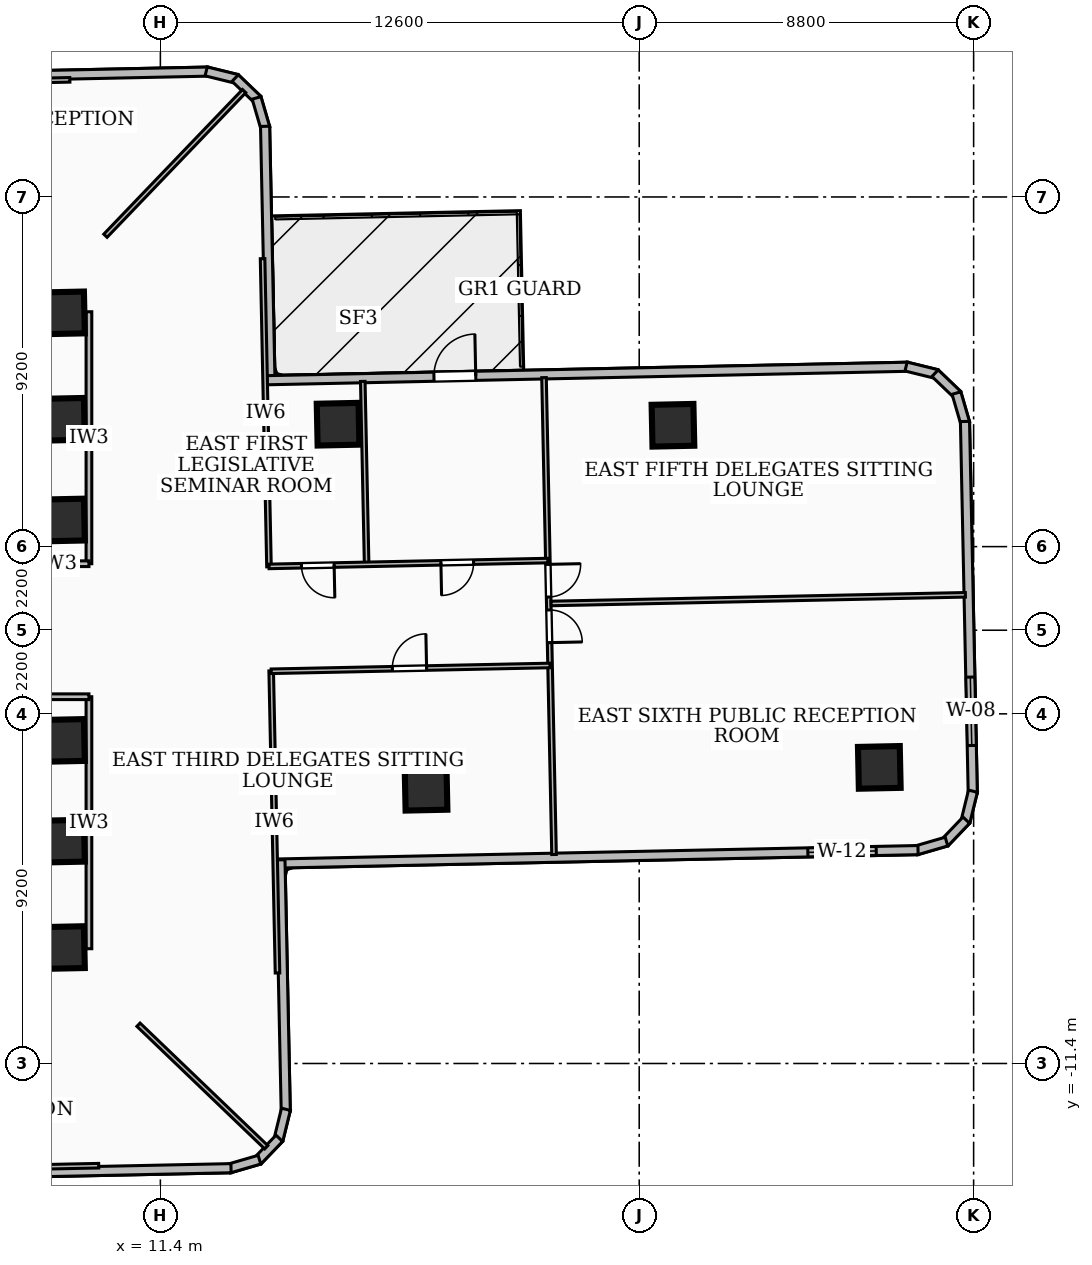
"""IFC4 building model, lengths in metres.
Left out: names, types, materials, properties, quantities, classifications, styles, units other than length and angle.
Written with IfcOpenShell. Run it as: python <this file> out.ifc"""

import sys

from ifc_helpers import new_model, si_unit, direction, frame, frame_2d, origin, origin_2d, place, context, subcontext, project, spatial, rectangle, extrude, element, fill, save


model = new_model("IFC4")
c1 = context("Model", 3, precision=1e-05, world=origin(), true_north=direction((0.0, 1.0)))
c2 = subcontext(c1, "Body", "Model", "MODEL_VIEW")
j1 = project(units=[si_unit("LENGTHUNIT", "METRE"), si_unit("PLANEANGLEUNIT", "RADIAN")], contexts=[c1])
p1 = place(None, origin())
s1 = spatial("IfcSite", under=j1, at=p1, CompositionType="ELEMENT")
p2 = place(p1, origin())
s2 = spatial("IfcBuilding", under=s1, at=p2, CompositionType="ELEMENT")
p3 = place(p2, frame((0.0, 0.0, 35.28)))
s3 = spatial("IfcBuildingStorey", under=s2, at=p3, CompositionType="ELEMENT", Elevation=35.28)
for number, where, z_axis, x_axis in (
    (1, (-8.78, 8.585, 0.0), (0.0, 0.0, 1.0), (1.0, 0.0, 0.0)),
    (2, (8.78, -8.585, 0.0), (0.0, 0.0, 1.0), (-1.0, 0.0, 0.0)),
):
    element("IfcWall", number, at=place(p3, frame(where, z_axis=z_axis, x_axis=x_axis)), inside=s3, PredefinedType="SHEAR", context=c2, shape_type="SweptSolid", body=[
        extrude(rectangle(XDim=17.56, YDim=0.55, at=frame_2d((8.78, 0.0))), origin(), (0.0, 0.0, 1.0), 3.34),
    ])
for number, where, z_axis, x_axis in (
    (3, (8.85, -5.55, 0.0), (0.0, 0.0, 1.0), (1.0, 0.021, 0.0)),
    (4, (8.85, -2.9, 0.0), (0.0, 0.0, 1.0), (1.0, 0.021, 0.0)),
    (5, (8.85, 2.9, 0.0), (0.0, 0.0, 1.0), (1.0, 0.021, 0.0)),
    (6, (8.85, 5.55, 0.0), (0.0, 0.0, 1.0), (1.0, 0.021, 0.0)),
    (7, (8.85, -8.35, 0.0), (0.0, 0.0, 1.0), (1.0, 0.021, 0.0)),
    (8, (8.85, 8.35, 0.0), (0.0, 0.0, 1.0), (1.0, 0.021, 0.0)),
    (9, (18.391, -4.184, 0.0), (0.0, 0.0, 1.0), (1.0, 0.021, 0.0)),
    (10, (16.076, 5.421, 0.0), (0.0, 0.0, 1.0), (1.0, 0.021, 0.0)),
    (11, (30.318, -3.609, 0.0), (0.0, 0.0, 1.0), (1.0, 0.021, 0.0)),
    (12, (24.888, 5.393, 0.0), (0.0, 0.0, 1.0), (1.0, 0.021, 0.0)),
):
    element("IfcColumn", number, at=place(p3, frame(where, z_axis=z_axis, x_axis=x_axis)), inside=s3, PredefinedType="COLUMN", context=c2, shape_type="SweptSolid", body=[
        extrude(rectangle(XDim=1.1, YDim=1.1, at=origin_2d()), origin(), (0.0, 0.0, 1.0), 3.6),
    ])
p4 = place(p3, frame((6.041, 14.559, 0.0), z_axis=(0.0, 0.0, 1.0), x_axis=(0.999776327957, 0.021149327571, 0.0)))
e13 = element("IfcWall", 13, at=p4, inside=s3, PredefinedType="SOLIDWALL", context=c2, shape_type="SweptSolid", body=[
    extrude(rectangle(XDim=6.615, YDim=0.24, at=frame_2d((3.307, 0.0))), origin(), (0.0, 0.0, 1.0), 2.421),
])
p5 = place(p3, frame((12.605, 14.704, 0.0), z_axis=(0.0, 0.0, 1.0), x_axis=(0.971120878097, -0.238588013371, 0.0)))
e14 = element("IfcWall", 14, at=p5, inside=s3, PredefinedType="SOLIDWALL", context=c2, shape_type="SweptSolid", body=[
    extrude(rectangle(XDim=0.83, YDim=0.24, at=frame_2d((0.415, 0.0))), origin(), (0.0, 0.0, 1.0), 3.34),
])
p6 = place(p3, frame((13.369, 14.529, 0.0), z_axis=(0.0, 0.0, 1.0), x_axis=(0.721807017337, -0.692094379202, 0.0)))
e15 = element("IfcWall", 15, at=p6, inside=s3, PredefinedType="SOLIDWALL", context=c2, shape_type="SweptSolid", body=[
    extrude(rectangle(XDim=0.813, YDim=0.24, at=frame_2d((0.407, 0.0))), origin(), (0.0, 0.0, 1.0), 3.34),
])
p7 = place(p3, frame((13.931, 14.007, 0.0), z_axis=(0.0, 0.0, 1.0), x_axis=(0.279649933772, -0.960102033401, 0.0)))
e16 = element("IfcWall", 16, at=p7, inside=s3, PredefinedType="SOLIDWALL", context=c2, shape_type="SweptSolid", body=[
    extrude(rectangle(XDim=0.83, YDim=0.24, at=frame_2d((0.415, 0.0))), origin(), (0.0, 0.0, 1.0), 3.34),
])
p8 = place(p3, frame((14.155, 13.259, 0.0), z_axis=(0.0, 0.0, 1.0), x_axis=(0.021111649844, -0.999777124284, 0.0)))
e17 = element("IfcWall", 17, at=p8, inside=s3, PredefinedType="SOLIDWALL", context=c2, shape_type="SweptSolid", body=[
    extrude(rectangle(XDim=6.777, YDim=0.24, at=frame_2d((3.388, 0.0))), origin(), (0.0, 0.0, 1.0), 2.644),
])
p9 = place(p3, frame((14.2, 6.578, 0.0), z_axis=(0.0, 0.0, 1.0), x_axis=(0.999778412505, 0.021050555542, 0.0)))
e18 = element("IfcWall", 18, at=p9, inside=s3, PredefinedType="SOLIDWALL", context=c2, shape_type="SweptSolid", body=[
    extrude(rectangle(XDim=16.875, YDim=0.24, at=frame_2d((8.438, 0.0))), origin(), (0.0, 0.0, 1.0), 2.644),
])
p10 = place(p9, frame((4.4, 0.0, 0.0)))
e19 = element("IfcOpeningElement", 19, at=p10, cuts=e18, PredefinedType="OPENING", context=c2, shape_type="SweptSolid", body=[
    extrude(rectangle(XDim=1.1, YDim=2.1, at=frame_2d((0.55, 1.05))), frame((0.0, 0.13, 0.0), z_axis=(0.0, -1.0, 0.0), x_axis=(1.0, 0.0, 0.0)), (0.0, 0.0, 1.0), 0.26),
])
p11 = place(p3, frame((31.022, 6.938, 0.0), z_axis=(0.0, 0.0, 1.0), x_axis=(0.971120878097, -0.238588013371, 0.0)))
e20 = element("IfcWall", 20, at=p11, inside=s3, PredefinedType="SOLIDWALL", context=c2, shape_type="SweptSolid", body=[
    extrude(rectangle(XDim=0.83, YDim=0.24, at=frame_2d((0.415, 0.0))), origin(), (0.0, 0.0, 1.0), 3.34),
])
p12 = place(p3, frame((31.786, 6.763, 0.0), z_axis=(0.0, 0.0, 1.0), x_axis=(0.721807017337, -0.692094379202, 0.0)))
e21 = element("IfcWall", 21, at=p12, inside=s3, PredefinedType="SOLIDWALL", context=c2, shape_type="SweptSolid", body=[
    extrude(rectangle(XDim=0.813, YDim=0.24, at=frame_2d((0.407, 0.0))), origin(), (0.0, 0.0, 1.0), 3.34),
])
p13 = place(p3, frame((32.348, 6.241, 0.0), z_axis=(0.0, 0.0, 1.0), x_axis=(0.2797289077, -0.960079027058, 0.0)))
e22 = element("IfcWall", 22, at=p13, inside=s3, PredefinedType="SOLIDWALL", context=c2, shape_type="SweptSolid", body=[
    extrude(rectangle(XDim=0.83, YDim=0.24, at=frame_2d((0.415, 0.0))), origin(), (0.0, 0.0, 1.0), 3.34),
])
p14 = place(p3, frame((32.572, 5.493, 0.0), z_axis=(0.0, 0.0, 1.0), x_axis=(0.020971264701, -0.999780078846, 0.0)))
e23 = element("IfcWall", 23, at=p14, inside=s3, PredefinedType="SOLIDWALL", context=c2, shape_type="SweptSolid", body=[
    extrude(rectangle(XDim=9.779, YDim=0.24, at=frame_2d((4.89, 0.0))), origin(), (0.0, 0.0, 1.0), 3.34),
])
p15 = place(p14, frame((6.728, 0.0, 0.85)))
e24 = element("IfcOpeningElement", 24, at=p15, cuts=e23, PredefinedType="OPENING", context=c2, shape_type="SweptSolid", body=[
    extrude(rectangle(XDim=1.8, YDim=1.8, at=frame_2d((0.9, 0.9))), frame((0.0, 0.13, 0.0), z_axis=(0.0, -1.0, 0.0), x_axis=(1.0, 0.0, 0.0)), (0.0, 0.0, 1.0), 0.26),
])
p16 = place(p3, frame((32.782, -4.235, 0.0), z_axis=(0.0, 0.0, 1.0), x_axis=(-0.238860968489, -0.971053776952, 0.0)))
e25 = element("IfcWall", 25, at=p16, inside=s3, PredefinedType="SOLIDWALL", context=c2, shape_type="SweptSolid", body=[
    extrude(rectangle(XDim=0.829, YDim=0.24, at=frame_2d((0.415, 0.0))), origin(), (0.0, 0.0, 1.0), 3.34),
])
p17 = place(p3, frame((32.607, -4.998, 0.0), z_axis=(0.0, 0.0, 1.0), x_axis=(-0.691018151037, -0.722837405602, 0.0)))
e26 = element("IfcWall", 26, at=p17, inside=s3, PredefinedType="SOLIDWALL", context=c2, shape_type="SweptSolid", body=[
    extrude(rectangle(XDim=0.813, YDim=0.24, at=frame_2d((0.407, 0.0))), origin(), (0.0, 0.0, 1.0), 3.34),
])
p18 = place(p3, frame((32.086, -5.561, 0.0), z_axis=(0.0, 0.0, 1.0), x_axis=(-0.960249728562, -0.279142362954, 0.0)))
e27 = element("IfcWall", 27, at=p18, inside=s3, PredefinedType="SOLIDWALL", context=c2, shape_type="SweptSolid", body=[
    extrude(rectangle(XDim=0.831, YDim=0.24, at=frame_2d((0.416, 0.0))), origin(), (0.0, 0.0, 1.0), 3.34),
])
p19 = place(p3, frame((31.337, -5.785, 0.0), z_axis=(0.0, 0.0, 1.0), x_axis=(-0.999779951425, -0.020977338469, 0.0)))
e28 = element("IfcWall", 28, at=p19, inside=s3, PredefinedType="SOLIDWALL", context=c2, shape_type="SweptSolid", body=[
    extrude(rectangle(XDim=16.875, YDim=0.24, at=frame_2d((8.438, 0.0))), origin(), (0.0, 0.0, 1.0), 3.34),
])
p20 = place(p19, frame((1.1, 0.0, 0.85)))
e29 = element("IfcOpeningElement", 29, at=p20, cuts=e28, PredefinedType="OPENING", context=c2, shape_type="SweptSolid", body=[
    extrude(rectangle(XDim=1.8, YDim=1.6, at=frame_2d((0.9, 0.8))), frame((0.0, 0.13, 0.0), z_axis=(0.0, -1.0, 0.0), x_axis=(1.0, 0.0, 0.0)), (0.0, 0.0, 1.0), 0.26),
])
p21 = place(p3, frame((14.559, -6.041, 0.0), z_axis=(0.0, 0.0, 1.0), x_axis=(0.021149327571, -0.999776327957, 0.0)))
e30 = element("IfcWall", 30, at=p21, inside=s3, PredefinedType="SOLIDWALL", context=c2, shape_type="SweptSolid", body=[
    extrude(rectangle(XDim=6.615, YDim=0.24, at=frame_2d((3.307, 0.0))), origin(), (0.0, 0.0, 1.0), 3.34),
])
p22 = place(p3, frame((14.704, -12.605, 0.0), z_axis=(0.0, 0.0, 1.0), x_axis=(-0.238588013371, -0.971120878097, 0.0)))
e31 = element("IfcWall", 31, at=p22, inside=s3, PredefinedType="SOLIDWALL", context=c2, shape_type="SweptSolid", body=[
    extrude(rectangle(XDim=0.83, YDim=0.24, at=frame_2d((0.415, 0.0))), origin(), (0.0, 0.0, 1.0), 3.34),
])
p23 = place(p3, frame((14.529, -13.369, 0.0), z_axis=(0.0, 0.0, 1.0), x_axis=(-0.692094379202, -0.721807017337, 0.0)))
e32 = element("IfcWall", 32, at=p23, inside=s3, PredefinedType="SOLIDWALL", context=c2, shape_type="SweptSolid", body=[
    extrude(rectangle(XDim=0.813, YDim=0.24, at=frame_2d((0.407, 0.0))), origin(), (0.0, 0.0, 1.0), 3.34),
])
p24 = place(p3, frame((14.007, -13.931, 0.0), z_axis=(0.0, 0.0, 1.0), x_axis=(-0.960102033401, -0.279649933772, 0.0)))
e33 = element("IfcWall", 33, at=p24, inside=s3, PredefinedType="SOLIDWALL", context=c2, shape_type="SweptSolid", body=[
    extrude(rectangle(XDim=0.83, YDim=0.24, at=frame_2d((0.415, 0.0))), origin(), (0.0, 0.0, 1.0), 3.34),
])
p25 = place(p3, frame((13.259, -14.155, 0.0), z_axis=(0.0, 0.0, 1.0), x_axis=(-0.999777124284, -0.021111649844, 0.0)))
e34 = element("IfcWall", 34, at=p25, inside=s3, PredefinedType="SOLIDWALL", context=c2, shape_type="SweptSolid", body=[
    extrude(rectangle(XDim=6.777, YDim=0.24, at=frame_2d((3.388, 0.0))), origin(), (0.0, 0.0, 1.0), 3.34),
])
p26 = place(p3, frame((9.52, 1.75, 0.0), z_axis=(0.0, 0.0, 1.0), x_axis=(0.0, 1.0, 0.0)))
e35 = element("IfcWall", 35, at=p26, inside=s3, PredefinedType="PARTITIONING", context=c2, shape_type="SweptSolid", body=[
    extrude(rectangle(XDim=6.63, YDim=0.15, at=frame_2d((3.315, 0.0))), origin(), (0.0, 0.0, 1.0), 2.421),
])
p27 = place(p3, frame((7.85, 1.75, 0.0), z_axis=(0.0, 0.0, 1.0), x_axis=(1.0, 0.0, 0.0)))
e36 = element("IfcWall", 36, at=p27, inside=s3, PredefinedType="PARTITIONING", context=c2, shape_type="SweptSolid", body=[
    extrude(rectangle(XDim=1.67, YDim=0.15, at=frame_2d((0.835, 0.0))), origin(), (0.0, 0.0, 1.0), 2.405),
])
p28 = place(p3, frame((9.52, -8.38, 0.0), z_axis=(0.0, 0.0, 1.0), x_axis=(0.0, 1.0, 0.0)))
e37 = element("IfcWall", 37, at=p28, inside=s3, PredefinedType="PARTITIONING", context=c2, shape_type="SweptSolid", body=[
    extrude(rectangle(XDim=6.63, YDim=0.15, at=frame_2d((3.315, 0.0))), origin(), (0.0, 0.0, 1.0), 2.421),
])
p29 = place(p3, frame((7.85, -1.75, 0.0), z_axis=(0.0, 0.0, 1.0), x_axis=(1.0, 0.0, 0.0)))
e38 = element("IfcWall", 38, at=p29, inside=s3, PredefinedType="PARTITIONING", context=c2, shape_type="SweptSolid", body=[
    extrude(rectangle(XDim=1.67, YDim=0.15, at=frame_2d((0.835, 0.0))), origin(), (0.0, 0.0, 1.0), 2.405),
])
p30 = place(p3, frame((9.954, 10.38, 0.0), z_axis=(0.0, 0.0, 1.0), x_axis=(0.692136602063, 0.721766530178, 0.0)))
e39 = element("IfcWall", 39, at=p30, inside=s3, PredefinedType="PARTITIONING", context=c2, shape_type="SweptSolid", body=[
    extrude(rectangle(XDim=5.273, YDim=0.12, at=frame_2d((2.637, 0.0))), origin(), (0.0, 0.0, 1.0), 2.644),
])
p31 = place(p3, frame((10.824, -10.38, 0.0), z_axis=(0.0, 0.0, 1.0), x_axis=(0.721757981693, -0.692145516392, 0.0)))
e40 = element("IfcWall", 40, at=p31, inside=s3, PredefinedType="PARTITIONING", context=c2, shape_type="SweptSolid", body=[
    extrude(rectangle(XDim=4.658, YDim=0.12, at=frame_2d((2.329, 0.0))), origin(), (0.0, 0.0, 1.0), 3.34),
])
p32 = place(p3, frame((14.258, 1.669, 0.0), z_axis=(0.0, 0.0, 1.0), x_axis=(-0.020831948152, 0.999782991422, 0.0)))
e41 = element("IfcWall", 41, at=p32, inside=s3, PredefinedType="PARTITIONING", context=c2, shape_type="SweptSolid", body=[
    extrude(rectangle(XDim=8.11, YDim=0.12, at=frame_2d((4.055, 0.0))), origin(), (0.0, 0.0, 1.0), 2.421),
])
p33 = place(p3, frame((14.482, -9.018, 0.0), z_axis=(0.0, 0.0, 1.0), x_axis=(-0.020883173321, 0.999781922757, 0.0)))
e42 = element("IfcWall", 42, at=p33, inside=s3, PredefinedType="PARTITIONING", context=c2, shape_type="SweptSolid", body=[
    extrude(rectangle(XDim=7.95, YDim=0.12, at=frame_2d((3.975, 0.0))), origin(), (0.0, 0.0, 1.0), 2.421),
])
p34 = place(p3, frame((16.827, 1.753, 0.0), z_axis=(0.0, 0.0, 1.0), x_axis=(-0.021027075848, 0.999778906599, 0.0)))
e43 = element("IfcWall", 43, at=p34, inside=s3, PredefinedType="PARTITIONING", context=c2, shape_type="SweptSolid", body=[
    extrude(rectangle(XDim=4.795, YDim=0.12, at=frame_2d((2.397, 0.0))), origin(), (0.0, 0.0, 1.0), 2.421),
])
p35 = place(p3, frame((21.596, 1.833, 0.0), z_axis=(0.0, 0.0, 1.0), x_axis=(-0.999779695776, -0.020989519165, 0.0)))
e44 = element("IfcWall", 44, at=p35, inside=s3, PredefinedType="PARTITIONING", context=c2, shape_type="SweptSolid", body=[
    extrude(rectangle(XDim=7.34, YDim=0.12, at=frame_2d((3.67, 0.0))), origin(), (0.0, 0.0, 1.0), 2.869),
])
p36 = place(p35, frame((5.625, 0.0, 0.0)))
e45 = element("IfcOpeningElement", 45, at=p36, cuts=e44, PredefinedType="OPENING", context=c2, shape_type="SweptSolid", body=[
    extrude(rectangle(XDim=0.86, YDim=2.04, at=frame_2d((0.43, 1.02))), frame((0.0, 0.07, 0.0), z_axis=(0.0, -1.0, 0.0), x_axis=(1.0, 0.0, 0.0)), (0.0, 0.0, 1.0), 0.14),
])
p37 = place(p35, frame((1.955, 0.0, 0.0)))
e46 = element("IfcOpeningElement", 46, at=p37, cuts=e44, PredefinedType="OPENING", context=c2, shape_type="SweptSolid", body=[
    extrude(rectangle(XDim=0.86, YDim=2.04, at=frame_2d((0.43, 1.02))), frame((0.0, 0.07, 0.0), z_axis=(0.0, -1.0, 0.0), x_axis=(1.0, 0.0, 0.0)), (0.0, 0.0, 1.0), 0.14),
])
p38 = place(p3, frame((14.316, -1.08, 0.0), z_axis=(0.0, 0.0, 1.0), x_axis=(0.999782493564, 0.020855828042, 0.0)))
e47 = element("IfcWall", 47, at=p38, inside=s3, PredefinedType="PARTITIONING", context=c2, shape_type="SweptSolid", body=[
    extrude(rectangle(XDim=7.34, YDim=0.12, at=frame_2d((3.67, 0.0))), origin(), (0.0, 0.0, 1.0), 2.869),
])
p39 = place(p38, frame((3.19, 0.0, 0.0)))
e48 = element("IfcOpeningElement", 48, at=p39, cuts=e47, PredefinedType="OPENING", context=c2, shape_type="SweptSolid", body=[
    extrude(rectangle(XDim=0.9, YDim=2.06, at=frame_2d((0.45, 1.03))), frame((0.0, 0.07, 0.0), z_axis=(0.0, -1.0, 0.0), x_axis=(1.0, 0.0, 0.0)), (0.0, 0.0, 1.0), 0.14),
])
p40 = place(p3, frame((21.68, 0.704, 0.0), z_axis=(0.0, 0.0, 1.0), x_axis=(0.999781840983, 0.02088708788, 0.0)))
e49 = element("IfcWall", 49, at=p40, inside=s3, PredefinedType="PARTITIONING", context=c2, shape_type="SweptSolid", body=[
    extrude(rectangle(XDim=10.906, YDim=0.12, at=frame_2d((5.453, 0.0))), origin(), (0.0, 0.0, 1.0), 2.72),
])
p41 = place(p3, frame((21.495, 6.647, 0.0), z_axis=(0.0, 0.0, 1.0), x_axis=(0.021028114531, -0.999778884754, 0.0)))
e50 = element("IfcWall", 50, at=p41, inside=s3, PredefinedType="PARTITIONING", context=c2, shape_type="SweptSolid", body=[
    extrude(rectangle(XDim=12.551, YDim=0.12, at=frame_2d((6.275, 0.0))), origin(), (0.0, 0.0, 1.0), 2.421),
])
p42 = place(p41, frame((6.115, 0.0, 0.0)))
e51 = element("IfcOpeningElement", 51, at=p42, cuts=e50, PredefinedType="OPENING", context=c2, shape_type="SweptSolid", body=[
    extrude(rectangle(XDim=0.86, YDim=2.04, at=frame_2d((0.43, 1.02))), frame((0.0, 0.07, 0.0), z_axis=(0.0, -1.0, 0.0), x_axis=(1.0, 0.0, 0.0)), (0.0, 0.0, 1.0), 0.14),
])
p43 = place(p41, frame((4.915, 0.0, 0.0)))
e52 = element("IfcOpeningElement", 52, at=p43, cuts=e50, PredefinedType="OPENING", context=c2, shape_type="SweptSolid", body=[
    extrude(rectangle(XDim=0.86, YDim=2.04, at=frame_2d((0.43, 1.02))), frame((0.0, 0.07, 0.0), z_axis=(0.0, -1.0, 0.0), x_axis=(1.0, 0.0, 0.0)), (0.0, 0.0, 1.0), 0.14),
])
p44 = place(p3, frame((9.018, 14.482, 0.0), z_axis=(0.0, 0.0, 1.0), x_axis=(-0.999781922757, -0.020883173321, 0.0)))
e53 = element("IfcWall", 53, at=p44, inside=s3, PredefinedType="PARTITIONING", context=c2, shape_type="SweptSolid", body=[
    extrude(rectangle(XDim=7.95, YDim=0.12, at=frame_2d((3.975, 0.0))), origin(), (0.0, 0.0, 1.0), 2.421),
])
p45 = place(p3, frame((1.669, -14.258, 0.0), z_axis=(0.0, 0.0, 1.0), x_axis=(0.999782991422, 0.020831948152, 0.0)))
e54 = element("IfcWall", 54, at=p45, inside=s3, PredefinedType="PARTITIONING", context=c2, shape_type="SweptSolid", body=[
    extrude(rectangle(XDim=8.11, YDim=0.12, at=frame_2d((4.055, 0.0))), origin(), (0.0, 0.0, 1.0), 2.421),
])
p46 = place(p10, origin())
e55 = element("IfcDoor", 55, at=p46, inside=s3, OperationType="SINGLE_SWING_RIGHT", PredefinedType="DOOR", context=c2, shape_type="SweptSolid", body=[
    extrude(rectangle(XDim=1.1, YDim=2.1, at=frame_2d((0.55, 1.05))), frame((0.0, 0.025, 0.0), z_axis=(0.0, -1.0, 0.0), x_axis=(1.0, 0.0, 0.0)), (0.0, 0.0, 1.0), 0.05),
])
fill(e19, e55)
p47 = place(p15, origin())
e56 = element("IfcWindow", 56, at=p47, inside=s3, PartitioningType="SINGLE_PANEL", PredefinedType="WINDOW", context=c2, shape_type="SweptSolid", body=[
    extrude(rectangle(XDim=1.8, YDim=1.8, at=frame_2d((0.9, 0.9))), frame((0.0, 0.03, 0.0), z_axis=(0.0, -1.0, 0.0), x_axis=(1.0, 0.0, 0.0)), (0.0, 0.0, 1.0), 0.06),
])
fill(e24, e56)
p48 = place(p20, origin())
e57 = element("IfcWindow", 57, at=p48, inside=s3, PartitioningType="SINGLE_PANEL", PredefinedType="WINDOW", context=c2, shape_type="SweptSolid", body=[
    extrude(rectangle(XDim=1.8, YDim=1.6, at=frame_2d((0.9, 0.8))), frame((0.0, 0.03, 0.0), z_axis=(0.0, -1.0, 0.0), x_axis=(1.0, 0.0, 0.0)), (0.0, 0.0, 1.0), 0.06),
])
fill(e29, e57)
p49 = place(p36, origin())
e58 = element("IfcDoor", 58, at=p49, inside=s3, OperationType="SINGLE_SWING_LEFT", PredefinedType="DOOR", context=c2, shape_type="SweptSolid", body=[
    extrude(rectangle(XDim=0.86, YDim=2.04, at=frame_2d((0.43, 1.02))), frame((0.0, 0.025, 0.0), z_axis=(0.0, -1.0, 0.0), x_axis=(1.0, 0.0, 0.0)), (0.0, 0.0, 1.0), 0.05),
])
fill(e45, e58)
p50 = place(p37, origin())
e59 = element("IfcDoor", 59, at=p50, inside=s3, OperationType="SINGLE_SWING_RIGHT", PredefinedType="DOOR", context=c2, shape_type="SweptSolid", body=[
    extrude(rectangle(XDim=0.86, YDim=2.04, at=frame_2d((0.43, 1.02))), frame((0.0, 0.025, 0.0), z_axis=(0.0, -1.0, 0.0), x_axis=(1.0, 0.0, 0.0)), (0.0, 0.0, 1.0), 0.05),
])
fill(e46, e59)
p51 = place(p39, origin())
e60 = element("IfcDoor", 60, at=p51, inside=s3, OperationType="SINGLE_SWING_RIGHT", PredefinedType="DOOR", context=c2, shape_type="SweptSolid", body=[
    extrude(rectangle(XDim=0.9, YDim=2.06, at=frame_2d((0.45, 1.03))), frame((0.0, 0.025, 0.0), z_axis=(0.0, -1.0, 0.0), x_axis=(1.0, 0.0, 0.0)), (0.0, 0.0, 1.0), 0.05),
])
fill(e48, e60)
p52 = place(p42, origin())
e61 = element("IfcDoor", 61, at=p52, inside=s3, OperationType="SINGLE_SWING_RIGHT", PredefinedType="DOOR", context=c2, shape_type="SweptSolid", body=[
    extrude(rectangle(XDim=0.86, YDim=2.04, at=frame_2d((0.43, 1.02))), frame((0.0, 0.025, 0.0), z_axis=(0.0, -1.0, 0.0), x_axis=(1.0, 0.0, 0.0)), (0.0, 0.0, 1.0), 0.05),
])
fill(e51, e61)
p53 = place(p43, origin())
e62 = element("IfcDoor", 62, at=p53, inside=s3, OperationType="SINGLE_SWING_LEFT", PredefinedType="DOOR", context=c2, shape_type="SweptSolid", body=[
    extrude(rectangle(XDim=0.86, YDim=2.04, at=frame_2d((0.43, 1.02))), frame((0.0, 0.025, 0.0), z_axis=(0.0, -1.0, 0.0), x_axis=(1.0, 0.0, 0.0)), (0.0, 0.0, 1.0), 0.05),
])
fill(e52, e62)
save(model, sys.argv[1])
